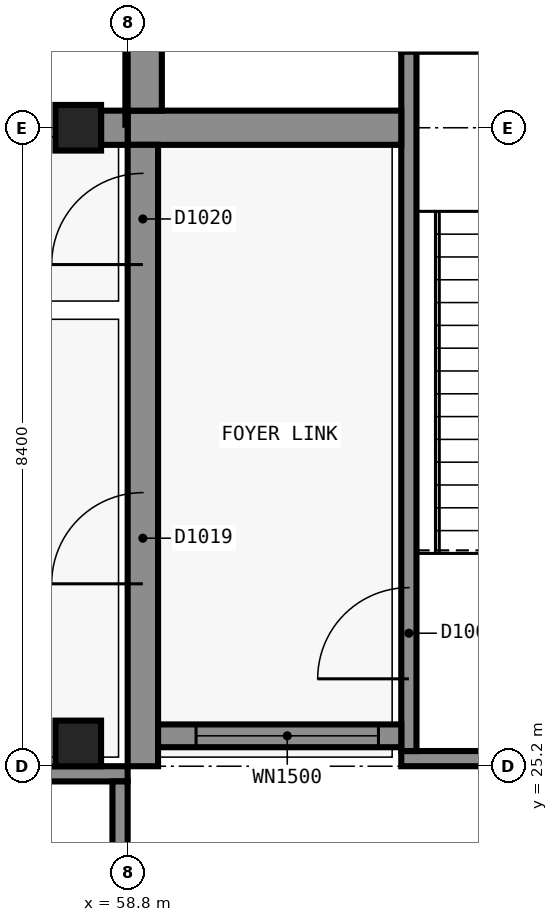
"""IFC4 building model, lengths in metres.
Left out: names, types, materials, properties, quantities, classifications, styles, units other than length and angle.
Written with IfcOpenShell. Run it as: python <this file> out.ifc"""

import sys

from ifc_helpers import new_model, si_unit, direction, frame, frame_2d, origin, origin_2d, place, context, subcontext, project, spatial, rectangle, extrude, element, fill, save


model = new_model("IFC4")
c1 = context("Model", 3, precision=1e-05, world=origin(), true_north=direction((0.0, 1.0)))
c2 = subcontext(c1, "Body", "Model", "MODEL_VIEW")
j1 = project(units=[si_unit("LENGTHUNIT", "METRE"), si_unit("PLANEANGLEUNIT", "RADIAN")], contexts=[c1])
p1 = place(None, origin())
s1 = spatial("IfcSite", under=j1, at=p1, CompositionType="ELEMENT")
p2 = place(p1, origin())
s2 = spatial("IfcBuilding", under=s1, at=p2, CompositionType="ELEMENT")
p3 = place(p2, frame((0.0, 0.0, 5.4)))
s3 = spatial("IfcBuildingStorey", under=s2, at=p3, CompositionType="ELEMENT", Elevation=5.4)
p4 = place(p3, frame((54.0, 25.1, 0.0), z_axis=(0.0, 0.0, 1.0), x_axis=(1.0, 0.0, 0.0)))
e1 = element("IfcWall", 1, at=p4, inside=s3, PredefinedType="SHEAR", context=c2, shape_type="SweptSolid", body=[
    extrude(rectangle(XDim=4.8, YDim=0.2, at=frame_2d((2.4, 0.0))), origin(), (0.0, 0.0, 1.0), 4.8),
])
p5 = place(p3, frame((58.7, 25.0, 0.0), z_axis=(0.0, 0.0, 1.0), x_axis=(0.0, -1.0, 0.0)))
e2 = element("IfcWall", 2, at=p5, inside=s3, PredefinedType="SHEAR", context=c2, shape_type="SweptSolid", body=[
    extrude(rectangle(XDim=9.2, YDim=0.2, at=frame_2d((4.6, 0.0))), origin(), (0.0, 0.0, 1.0), 4.8),
])
for number, where, z_axis, x_axis in (
    (3, (67.2, 25.3, 0.0), (0.0, 0.0, 1.0), (-1.0, 0.0, 0.0)),
    (4, (62.4, 34.7, 0.0), (0.0, 0.0, 1.0), (1.0, 0.0, 0.0)),
):
    element("IfcWall", number, at=place(p3, frame(where, z_axis=z_axis, x_axis=x_axis)), inside=s3, PredefinedType="SHEAR", context=c2, shape_type="SweptSolid", body=[
        extrude(rectangle(XDim=4.8, YDim=0.2, at=frame_2d((2.4, 0.0))), origin(), (0.0, 0.0, 1.0), 4.8),
    ])
p6 = place(p3, frame((62.5, 25.4, 0.0), z_axis=(0.0, 0.0, 1.0), x_axis=(0.0, 1.0, 0.0)))
e5 = element("IfcWall", 5, at=p6, inside=s3, PredefinedType="SHEAR", context=c2, shape_type="SweptSolid", body=[
    extrude(rectangle(XDim=9.2, YDim=0.2, at=frame_2d((4.6, 0.0))), origin(), (0.0, 0.0, 1.0), 4.8),
])
p7 = place(p6, frame((0.95, 0.0, 0.0)))
e6 = element("IfcOpeningElement", 6, at=p7, cuts=e5, PredefinedType="OPENING", context=c2, shape_type="SweptSolid", body=[
    extrude(rectangle(XDim=1.2, YDim=2.1, at=frame_2d((0.6, 1.05))), frame((0.0, 0.11, 0.0), z_axis=(0.0, -1.0, 0.0), x_axis=(1.0, 0.0, 0.0)), (0.0, 0.0, 1.0), 0.22),
])
p8 = place(p3, frame((62.4, 33.6, 0.0), z_axis=(0.0, 0.0, 1.0), x_axis=(-1.0, 0.0, 0.0)))
e7 = element("IfcWall", 7, at=p8, inside=s3, PredefinedType="SHEAR", context=c2, shape_type="SweptSolid", body=[
    extrude(rectangle(XDim=3.6, YDim=0.45, at=frame_2d((1.8, 0.0))), origin(), (0.0, 0.0, 1.0), 4.8),
])
p9 = place(p3, frame((59.025, 33.825, 0.0), z_axis=(0.0, 0.0, 1.0), x_axis=(0.0, 1.0, 0.0)))
e8 = element("IfcWall", 8, at=p9, inside=s3, PredefinedType="SHEAR", context=c2, shape_type="SweptSolid", body=[
    extrude(rectangle(XDim=23.775, YDim=0.45, at=frame_2d((11.888, 0.0))), origin(), (0.0, 0.0, 1.0), 4.8),
])
p10 = place(p3, frame((59.0, 25.2, 0.0), z_axis=(0.0, 0.0, 1.0), x_axis=(0.0, 1.0, 0.0)))
e9 = element("IfcWall", 9, at=p10, inside=s3, PredefinedType="SHEAR", context=c2, shape_type="SweptSolid", body=[
    extrude(rectangle(XDim=8.175, YDim=0.4, at=frame_2d((4.087, 0.0))), origin(), (0.0, 0.0, 1.0), 4.8),
])
p11 = place(p10, frame((2.4, 0.0, 0.0)))
e10 = element("IfcOpeningElement", 10, at=p11, cuts=e9, PredefinedType="OPENING", context=c2, shape_type="SweptSolid", body=[
    extrude(rectangle(XDim=1.2, YDim=2.1, at=frame_2d((0.6, 1.05))), frame((0.0, 0.21, 0.0), z_axis=(0.0, -1.0, 0.0), x_axis=(1.0, 0.0, 0.0)), (0.0, 0.0, 1.0), 0.42),
])
p12 = place(p10, frame((6.6, 0.0, 0.0)))
e11 = element("IfcOpeningElement", 11, at=p12, cuts=e9, PredefinedType="OPENING", context=c2, shape_type="SweptSolid", body=[
    extrude(rectangle(XDim=1.2, YDim=2.1, at=frame_2d((0.6, 1.05))), frame((0.0, 0.21, 0.0), z_axis=(0.0, -1.0, 0.0), x_axis=(1.0, 0.0, 0.0)), (0.0, 0.0, 1.0), 0.42),
])
for number, where, z_axis, x_axis in (
    (12, (58.15, 25.5, 0.0), (0.0, 0.0, 1.0), (1.0, 0.0, 0.0)),
    (13, (58.15, 33.6, 0.0), (0.0, 0.0, 1.0), (1.0, 0.0, 0.0)),
):
    element("IfcColumn", number, at=place(p3, frame(where, z_axis=z_axis, x_axis=x_axis)), inside=s3, PredefinedType="COLUMN", context=c2, shape_type="SweptSolid", body=[
        extrude(rectangle(XDim=0.6, YDim=0.6, at=origin_2d()), origin(), (0.0, 0.0, 1.0), 4.8),
    ])
p13 = place(p3, frame((58.625, 33.375, 0.0), z_axis=(0.0, 0.0, 1.0), x_axis=(0.0, 1.0, 0.0)))
e14 = element("IfcWall", 14, at=p13, inside=s3, PredefinedType="SHEAR", context=c2, shape_type="SweptSolid", body=[
    extrude(rectangle(XDim=0.45, YDim=0.35, at=frame_2d((0.225, 0.0))), origin(), (0.0, 0.0, 1.0), 4.8),
])
p14 = place(p3, frame((62.4, 25.6, 0.0), z_axis=(0.0, 0.0, 1.0), x_axis=(-1.0, 0.0, 0.0)))
e15 = element("IfcWall", 15, at=p14, inside=s3, PredefinedType="SOLIDWALL", context=c2, shape_type="SweptSolid", body=[
    extrude(rectangle(XDim=3.2, YDim=0.3, at=frame_2d((1.6, 0.0))), origin(), (0.0, 0.0, 1.0), 4.5),
])
p15 = place(p14, frame((0.3, 0.0, 0.9)))
e16 = element("IfcOpeningElement", 16, at=p15, cuts=e15, PredefinedType="OPENING", context=c2, shape_type="SweptSolid", body=[
    extrude(rectangle(XDim=2.4, YDim=1.8, at=frame_2d((1.2, 0.9))), frame((0.0, 0.16, 0.0), z_axis=(0.0, -1.0, 0.0), x_axis=(1.0, 0.0, 0.0)), (0.0, 0.0, 1.0), 0.32),
])
p16 = place(p15, origin())
e17 = element("IfcWindow", 17, at=p16, inside=s3, PartitioningType="SINGLE_PANEL", PredefinedType="WINDOW", context=c2, shape_type="SweptSolid", body=[
    extrude(rectangle(XDim=2.4, YDim=1.8, at=frame_2d((1.2, 0.9))), frame((0.0, 0.03, 0.0), z_axis=(0.0, -1.0, 0.0), x_axis=(1.0, 0.0, 0.0)), (0.0, 0.0, 1.0), 0.06),
])
fill(e16, e17)
p17 = place(p7, origin())
e18 = element("IfcDoor", 18, at=p17, inside=s3, OperationType="SINGLE_SWING_LEFT", PredefinedType="DOOR", context=c2, shape_type="SweptSolid", body=[
    extrude(rectangle(XDim=1.2, YDim=2.1, at=frame_2d((0.6, 1.05))), frame((0.0, 0.025, 0.0), z_axis=(0.0, -1.0, 0.0), x_axis=(1.0, 0.0, 0.0)), (0.0, 0.0, 1.0), 0.05),
])
fill(e6, e18)
p18 = place(p11, origin())
e19 = element("IfcDoor", 19, at=p18, inside=s3, OperationType="SINGLE_SWING_RIGHT", PredefinedType="DOOR", context=c2, shape_type="SweptSolid", body=[
    extrude(rectangle(XDim=1.2, YDim=2.1, at=frame_2d((0.6, 1.05))), frame((0.0, 0.025, 0.0), z_axis=(0.0, -1.0, 0.0), x_axis=(1.0, 0.0, 0.0)), (0.0, 0.0, 1.0), 0.05),
])
fill(e10, e19)
p19 = place(p12, origin())
e20 = element("IfcDoor", 20, at=p19, inside=s3, OperationType="SINGLE_SWING_LEFT", PredefinedType="DOOR", context=c2, shape_type="SweptSolid", body=[
    extrude(rectangle(XDim=1.2, YDim=2.1, at=frame_2d((0.6, 1.05))), frame((0.0, 0.025, 0.0), z_axis=(0.0, -1.0, 0.0), x_axis=(1.0, 0.0, 0.0)), (0.0, 0.0, 1.0), 0.05),
])
fill(e11, e20)
save(model, sys.argv[1])
